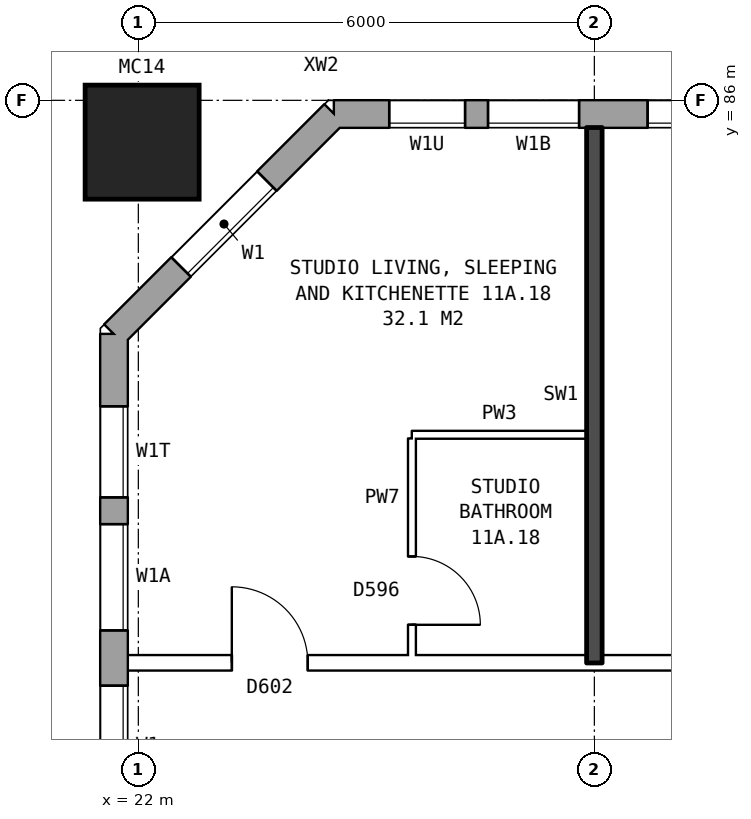
"""IFC4 building model, lengths in metres.
Left out: names, types, materials, properties, quantities, classifications, styles, units other than length and angle.
Written with IfcOpenShell. Run it as: python <this file> out.ifc"""

import sys

from ifc_helpers import new_model, si_unit, direction, frame, frame_2d, origin, origin_2d, place, context, subcontext, project, spatial, rectangle, hollow_rectangle, extrude, element, fill, save


model = new_model("IFC4")
c1 = context("Model", 3, precision=1e-05, world=origin(), true_north=direction((0.0, 1.0)))
c2 = subcontext(c1, "Body", "Model", "MODEL_VIEW")
j1 = project(units=[si_unit("LENGTHUNIT", "METRE"), si_unit("PLANEANGLEUNIT", "RADIAN")], contexts=[c1])
p1 = place(None, origin())
s1 = spatial("IfcSite", under=j1, at=p1, CompositionType="ELEMENT")
p2 = place(p1, origin())
s2 = spatial("IfcBuilding", under=s1, at=p2, CompositionType="ELEMENT")
p3 = place(p2, frame((0.0, 0.0, 44.3)))
s3 = spatial("IfcBuildingStorey", under=s2, at=p3, CompositionType="ELEMENT", Elevation=44.3)
p4 = place(p3, frame((22.05, 85.45, 0.0), z_axis=(0.0, 0.0, 1.0), x_axis=(1.0, 0.0, 0.0)))
e1 = element("IfcColumn", 1, at=p4, inside=s3, PredefinedType="COLUMN", context=c2, shape_type="SweptSolid", body=[
    extrude(hollow_rectangle(XDim=1.5, YDim=1.5, WallThickness=0.08, at=origin_2d()), origin(), (0.0, 0.0, 1.0), 3.1),
])
p5 = place(p3, frame((72.925, 85.82, 0.0), z_axis=(0.0, 0.0, 1.0), x_axis=(-1.0, 0.0, 0.0)))
e2 = element("IfcWall", 2, at=p5, inside=s3, PredefinedType="STANDARD", context=c2, shape_type="SweptSolid", body=[
    extrude(rectangle(XDim=48.351, YDim=0.36, at=frame_2d((24.175, 0.0))), origin(), (0.0, 0.0, 1.0), 2.85),
])
p6 = place(p5, frame((0.65, 0.0, 0.8)))
e3 = element("IfcOpeningElement", 3, at=p6, cuts=e2, PredefinedType="OPENING", context=c2, shape_type="SweptSolid", body=[
    extrude(rectangle(XDim=0.6, YDim=0.9, at=frame_2d((0.3, 0.45))), frame((0.0, 0.19, 0.0), z_axis=(0.0, -1.0, 0.0), x_axis=(1.0, 0.0, 0.0)), (0.0, 0.0, 1.0), 0.38),
])
p7 = place(p5, frame((3.625, 0.0, 0.8)))
e4 = element("IfcOpeningElement", 4, at=p7, cuts=e2, PredefinedType="OPENING", context=c2, shape_type="SweptSolid", body=[
    extrude(rectangle(XDim=1.6, YDim=1.8, at=frame_2d((0.8, 0.9))), frame((0.0, 0.19, 0.0), z_axis=(0.0, -1.0, 0.0), x_axis=(1.0, 0.0, 0.0)), (0.0, 0.0, 1.0), 0.38),
])
p8 = place(p5, frame((6.625, 0.0, 0.8)))
e5 = element("IfcOpeningElement", 5, at=p8, cuts=e2, PredefinedType="OPENING", context=c2, shape_type="SweptSolid", body=[
    extrude(rectangle(XDim=1.6, YDim=1.8, at=frame_2d((0.8, 0.9))), frame((0.0, 0.19, 0.0), z_axis=(0.0, -1.0, 0.0), x_axis=(1.0, 0.0, 0.0)), (0.0, 0.0, 1.0), 0.38),
])
p9 = place(p5, frame((9.625, 0.0, 0.8)))
e6 = element("IfcOpeningElement", 6, at=p9, cuts=e2, PredefinedType="OPENING", context=c2, shape_type="SweptSolid", body=[
    extrude(rectangle(XDim=1.6, YDim=1.8, at=frame_2d((0.8, 0.9))), frame((0.0, 0.19, 0.0), z_axis=(0.0, -1.0, 0.0), x_axis=(1.0, 0.0, 0.0)), (0.0, 0.0, 1.0), 0.38),
])
p10 = place(p5, frame((12.625, 0.0, 0.8)))
e7 = element("IfcOpeningElement", 7, at=p10, cuts=e2, PredefinedType="OPENING", context=c2, shape_type="SweptSolid", body=[
    extrude(rectangle(XDim=1.6, YDim=1.8, at=frame_2d((0.8, 0.9))), frame((0.0, 0.19, 0.0), z_axis=(0.0, -1.0, 0.0), x_axis=(1.0, 0.0, 0.0)), (0.0, 0.0, 1.0), 0.38),
])
p11 = place(p5, frame((15.625, 0.0, 0.8)))
e8 = element("IfcOpeningElement", 8, at=p11, cuts=e2, PredefinedType="OPENING", context=c2, shape_type="SweptSolid", body=[
    extrude(rectangle(XDim=1.6, YDim=1.8, at=frame_2d((0.8, 0.9))), frame((0.0, 0.19, 0.0), z_axis=(0.0, -1.0, 0.0), x_axis=(1.0, 0.0, 0.0)), (0.0, 0.0, 1.0), 0.38),
])
p12 = place(p5, frame((18.625, 0.0, 0.8)))
e9 = element("IfcOpeningElement", 9, at=p12, cuts=e2, PredefinedType="OPENING", context=c2, shape_type="SweptSolid", body=[
    extrude(rectangle(XDim=1.6, YDim=1.8, at=frame_2d((0.8, 0.9))), frame((0.0, 0.19, 0.0), z_axis=(0.0, -1.0, 0.0), x_axis=(1.0, 0.0, 0.0)), (0.0, 0.0, 1.0), 0.38),
])
p13 = place(p5, frame((21.625, 0.0, 0.8)))
e10 = element("IfcOpeningElement", 10, at=p13, cuts=e2, PredefinedType="OPENING", context=c2, shape_type="SweptSolid", body=[
    extrude(rectangle(XDim=1.6, YDim=1.8, at=frame_2d((0.8, 0.9))), frame((0.0, 0.19, 0.0), z_axis=(0.0, -1.0, 0.0), x_axis=(1.0, 0.0, 0.0)), (0.0, 0.0, 1.0), 0.38),
])
p14 = place(p5, frame((24.625, 0.0, 0.8)))
e11 = element("IfcOpeningElement", 11, at=p14, cuts=e2, PredefinedType="OPENING", context=c2, shape_type="SweptSolid", body=[
    extrude(rectangle(XDim=1.6, YDim=1.8, at=frame_2d((0.8, 0.9))), frame((0.0, 0.19, 0.0), z_axis=(0.0, -1.0, 0.0), x_axis=(1.0, 0.0, 0.0)), (0.0, 0.0, 1.0), 0.38),
])
p15 = place(p5, frame((27.625, 0.0, 0.8)))
e12 = element("IfcOpeningElement", 12, at=p15, cuts=e2, PredefinedType="OPENING", context=c2, shape_type="SweptSolid", body=[
    extrude(rectangle(XDim=1.6, YDim=1.8, at=frame_2d((0.8, 0.9))), frame((0.0, 0.19, 0.0), z_axis=(0.0, -1.0, 0.0), x_axis=(1.0, 0.0, 0.0)), (0.0, 0.0, 1.0), 0.38),
])
p16 = place(p5, frame((30.625, 0.0, 0.8)))
e13 = element("IfcOpeningElement", 13, at=p16, cuts=e2, PredefinedType="OPENING", context=c2, shape_type="SweptSolid", body=[
    extrude(rectangle(XDim=1.6, YDim=1.8, at=frame_2d((0.8, 0.9))), frame((0.0, 0.19, 0.0), z_axis=(0.0, -1.0, 0.0), x_axis=(1.0, 0.0, 0.0)), (0.0, 0.0, 1.0), 0.38),
])
p17 = place(p5, frame((33.625, 0.0, 0.8)))
e14 = element("IfcOpeningElement", 14, at=p17, cuts=e2, PredefinedType="OPENING", context=c2, shape_type="SweptSolid", body=[
    extrude(rectangle(XDim=1.6, YDim=1.8, at=frame_2d((0.8, 0.9))), frame((0.0, 0.19, 0.0), z_axis=(0.0, -1.0, 0.0), x_axis=(1.0, 0.0, 0.0)), (0.0, 0.0, 1.0), 0.38),
])
p18 = place(p5, frame((36.625, 0.0, 0.8)))
e15 = element("IfcOpeningElement", 15, at=p18, cuts=e2, PredefinedType="OPENING", context=c2, shape_type="SweptSolid", body=[
    extrude(rectangle(XDim=1.6, YDim=1.8, at=frame_2d((0.8, 0.9))), frame((0.0, 0.19, 0.0), z_axis=(0.0, -1.0, 0.0), x_axis=(1.0, 0.0, 0.0)), (0.0, 0.0, 1.0), 0.38),
])
p19 = place(p5, frame((39.625, 0.0, 0.8)))
e16 = element("IfcOpeningElement", 16, at=p19, cuts=e2, PredefinedType="OPENING", context=c2, shape_type="SweptSolid", body=[
    extrude(rectangle(XDim=1.6, YDim=1.8, at=frame_2d((0.8, 0.9))), frame((0.0, 0.19, 0.0), z_axis=(0.0, -1.0, 0.0), x_axis=(1.0, 0.0, 0.0)), (0.0, 0.0, 1.0), 0.38),
])
p20 = place(p5, frame((42.625, 0.0, 0.8)))
e17 = element("IfcOpeningElement", 17, at=p20, cuts=e2, PredefinedType="OPENING", context=c2, shape_type="SweptSolid", body=[
    extrude(rectangle(XDim=1.6, YDim=1.8, at=frame_2d((0.8, 0.9))), frame((0.0, 0.19, 0.0), z_axis=(0.0, -1.0, 0.0), x_axis=(1.0, 0.0, 0.0)), (0.0, 0.0, 1.0), 0.38),
])
p21 = place(p5, frame((45.125, 0.0, 0.8)))
e18 = element("IfcOpeningElement", 18, at=p21, cuts=e2, PredefinedType="OPENING", context=c2, shape_type="SweptSolid", body=[
    extrude(rectangle(XDim=1.2, YDim=1.8, at=frame_2d((0.6, 0.9))), frame((0.0, 0.19, 0.0), z_axis=(0.0, -1.0, 0.0), x_axis=(1.0, 0.0, 0.0)), (0.0, 0.0, 1.0), 0.38),
])
p22 = place(p5, frame((1.55, 0.0, 0.8)))
e19 = element("IfcOpeningElement", 19, at=p22, cuts=e2, PredefinedType="OPENING", context=c2, shape_type="SweptSolid", body=[
    extrude(rectangle(XDim=1.0, YDim=1.5, at=frame_2d((0.5, 0.75))), frame((0.0, 0.19, 0.0), z_axis=(0.0, -1.0, 0.0), x_axis=(1.0, 0.0, 0.0)), (0.0, 0.0, 1.0), 0.38),
])
p23 = place(p5, frame((46.625, 0.0, 0.8)))
e20 = element("IfcOpeningElement", 20, at=p23, cuts=e2, PredefinedType="OPENING", context=c2, shape_type="SweptSolid", body=[
    extrude(rectangle(XDim=1.0, YDim=0.9, at=frame_2d((0.5, 0.45))), frame((0.0, 0.19, 0.0), z_axis=(0.0, -1.0, 0.0), x_axis=(1.0, 0.0, 0.0)), (0.0, 0.0, 1.0), 0.38),
])
p24 = place(p3, frame((24.575, 85.82, 0.0), z_axis=(0.0, 0.0, 1.0), x_axis=(-0.707106781187, -0.707106781187, 0.0)))
e21 = element("IfcWall", 21, at=p24, inside=s3, PredefinedType="STANDARD", context=c2, shape_type="SweptSolid", body=[
    extrude(rectangle(XDim=4.094, YDim=0.36, at=frame_2d((2.047, 0.0))), origin(), (0.0, 0.0, 1.0), 2.85),
])
p25 = place(p24, frame((1.247, 0.0, 0.8)))
e22 = element("IfcOpeningElement", 22, at=p25, cuts=e21, PredefinedType="OPENING", context=c2, shape_type="SweptSolid", body=[
    extrude(rectangle(XDim=1.6, YDim=1.8, at=frame_2d((0.8, 0.9))), frame((0.0, 0.19, 0.0), z_axis=(0.0, -1.0, 0.0), x_axis=(1.0, 0.0, 0.0)), (0.0, 0.0, 1.0), 0.38),
])
p26 = place(p3, frame((21.68, 82.925, 0.0), z_axis=(0.0, 0.0, 1.0), x_axis=(0.0, -1.0, 0.0)))
e23 = element("IfcWall", 23, at=p26, inside=s3, PredefinedType="STANDARD", context=c2, shape_type="SweptSolid", body=[
    extrude(rectangle(XDim=25.851, YDim=0.36, at=frame_2d((12.925, 0.0))), origin(), (0.0, 0.0, 1.0), 2.85),
])
p27 = place(p26, frame((0.95, 0.0, 0.8)))
e24 = element("IfcOpeningElement", 24, at=p27, cuts=e23, PredefinedType="OPENING", context=c2, shape_type="SweptSolid", body=[
    extrude(rectangle(XDim=1.2, YDim=0.9, at=frame_2d((0.6, 0.45))), frame((0.0, 0.19, 0.0), z_axis=(0.0, -1.0, 0.0), x_axis=(1.0, 0.0, 0.0)), (0.0, 0.0, 1.0), 0.38),
])
p28 = place(p26, frame((4.625, 0.0, 0.8)))
e25 = element("IfcOpeningElement", 25, at=p28, cuts=e23, PredefinedType="OPENING", context=c2, shape_type="SweptSolid", body=[
    extrude(rectangle(XDim=1.6, YDim=1.8, at=frame_2d((0.8, 0.9))), frame((0.0, 0.19, 0.0), z_axis=(0.0, -1.0, 0.0), x_axis=(1.0, 0.0, 0.0)), (0.0, 0.0, 1.0), 0.38),
])
p29 = place(p26, frame((7.625, 0.0, 0.8)))
e26 = element("IfcOpeningElement", 26, at=p29, cuts=e23, PredefinedType="OPENING", context=c2, shape_type="SweptSolid", body=[
    extrude(rectangle(XDim=1.6, YDim=1.8, at=frame_2d((0.8, 0.9))), frame((0.0, 0.19, 0.0), z_axis=(0.0, -1.0, 0.0), x_axis=(1.0, 0.0, 0.0)), (0.0, 0.0, 1.0), 0.38),
])
p30 = place(p26, frame((10.625, 0.0, 0.8)))
e27 = element("IfcOpeningElement", 27, at=p30, cuts=e23, PredefinedType="OPENING", context=c2, shape_type="SweptSolid", body=[
    extrude(rectangle(XDim=1.6, YDim=1.8, at=frame_2d((0.8, 0.9))), frame((0.0, 0.19, 0.0), z_axis=(0.0, -1.0, 0.0), x_axis=(1.0, 0.0, 0.0)), (0.0, 0.0, 1.0), 0.38),
])
p31 = place(p26, frame((13.625, 0.0, 0.8)))
e28 = element("IfcOpeningElement", 28, at=p31, cuts=e23, PredefinedType="OPENING", context=c2, shape_type="SweptSolid", body=[
    extrude(rectangle(XDim=1.6, YDim=1.8, at=frame_2d((0.8, 0.9))), frame((0.0, 0.19, 0.0), z_axis=(0.0, -1.0, 0.0), x_axis=(1.0, 0.0, 0.0)), (0.0, 0.0, 1.0), 0.38),
])
p32 = place(p26, frame((16.625, 0.0, 0.8)))
e29 = element("IfcOpeningElement", 29, at=p32, cuts=e23, PredefinedType="OPENING", context=c2, shape_type="SweptSolid", body=[
    extrude(rectangle(XDim=1.6, YDim=1.8, at=frame_2d((0.8, 0.9))), frame((0.0, 0.19, 0.0), z_axis=(0.0, -1.0, 0.0), x_axis=(1.0, 0.0, 0.0)), (0.0, 0.0, 1.0), 0.38),
])
p33 = place(p26, frame((19.625, 0.0, 0.8)))
e30 = element("IfcOpeningElement", 30, at=p33, cuts=e23, PredefinedType="OPENING", context=c2, shape_type="SweptSolid", body=[
    extrude(rectangle(XDim=1.6, YDim=1.8, at=frame_2d((0.8, 0.9))), frame((0.0, 0.19, 0.0), z_axis=(0.0, -1.0, 0.0), x_axis=(1.0, 0.0, 0.0)), (0.0, 0.0, 1.0), 0.38),
])
p34 = place(p26, frame((21.725, 0.0, 0.8)))
e31 = element("IfcOpeningElement", 31, at=p34, cuts=e23, PredefinedType="OPENING", context=c2, shape_type="SweptSolid", body=[
    extrude(rectangle(XDim=1.6, YDim=1.8, at=frame_2d((0.8, 0.9))), frame((0.0, 0.19, 0.0), z_axis=(0.0, -1.0, 0.0), x_axis=(1.0, 0.0, 0.0)), (0.0, 0.0, 1.0), 0.38),
])
p35 = place(p26, frame((2.5, 0.0, 0.8)))
e32 = element("IfcOpeningElement", 32, at=p35, cuts=e23, PredefinedType="OPENING", context=c2, shape_type="SweptSolid", body=[
    extrude(rectangle(XDim=1.4, YDim=1.8, at=frame_2d((0.7, 0.9))), frame((0.0, 0.19, 0.0), z_axis=(0.0, -1.0, 0.0), x_axis=(1.0, 0.0, 0.0)), (0.0, 0.0, 1.0), 0.38),
])
p36 = place(p26, frame((23.625, 0.0, 0.8)))
e33 = element("IfcOpeningElement", 33, at=p36, cuts=e23, PredefinedType="OPENING", context=c2, shape_type="SweptSolid", body=[
    extrude(rectangle(XDim=0.6, YDim=1.2, at=frame_2d((0.3, 0.6))), frame((0.0, 0.19, 0.0), z_axis=(0.0, -1.0, 0.0), x_axis=(1.0, 0.0, 0.0)), (0.0, 0.0, 1.0), 0.38),
])
p37 = place(p3, frame((21.86, 78.6, 0.0), z_axis=(0.0, 0.0, 1.0), x_axis=(1.0, 0.0, 0.0)))
e34 = element("IfcWall", 34, at=p37, inside=s3, PredefinedType="PARTITIONING", context=c2, shape_type="SweptSolid", body=[
    extrude(rectangle(XDim=24.04, YDim=0.2, at=frame_2d((12.02, 0.0))), origin(), (0.0, 0.0, 1.0), 2.85),
])
p38 = place(p37, frame((20.59, 0.0, 0.0)))
e35 = element("IfcOpeningElement", 35, at=p38, cuts=e34, PredefinedType="OPENING", context=c2, shape_type="SweptSolid", body=[
    extrude(rectangle(XDim=1.0, YDim=2.1, at=frame_2d((0.5, 1.05))), frame((0.0, 0.11, 0.0), z_axis=(0.0, -1.0, 0.0), x_axis=(1.0, 0.0, 0.0)), (0.0, 0.0, 1.0), 0.22),
])
p39 = place(p37, frame((8.64, 0.0, 0.0)))
e36 = element("IfcOpeningElement", 36, at=p39, cuts=e34, PredefinedType="OPENING", context=c2, shape_type="SweptSolid", body=[
    extrude(rectangle(XDim=1.0, YDim=2.1, at=frame_2d((0.5, 1.05))), frame((0.0, 0.11, 0.0), z_axis=(0.0, -1.0, 0.0), x_axis=(1.0, 0.0, 0.0)), (0.0, 0.0, 1.0), 0.22),
])
p40 = place(p37, frame((1.37, 0.0, 0.0)))
e37 = element("IfcOpeningElement", 37, at=p40, cuts=e34, PredefinedType="OPENING", context=c2, shape_type="SweptSolid", body=[
    extrude(rectangle(XDim=1.0, YDim=2.1, at=frame_2d((0.5, 1.05))), frame((0.0, 0.11, 0.0), z_axis=(0.0, -1.0, 0.0), x_axis=(1.0, 0.0, 0.0)), (0.0, 0.0, 1.0), 0.22),
])
p41 = place(p3, frame((25.6, 81.6, 0.0), z_axis=(0.0, 0.0, 1.0), x_axis=(1.0, 0.0, 0.0)))
e38 = element("IfcWall", 38, at=p41, inside=s3, PredefinedType="PARTITIONING", context=c2, shape_type="SweptSolid", body=[
    extrude(rectangle(XDim=2.3, YDim=0.1, at=frame_2d((1.15, 0.0))), origin(), (0.0, 0.0, 1.0), 2.85),
])
p42 = place(p3, frame((25.6, 78.7, 0.0), z_axis=(0.0, 0.0, 1.0), x_axis=(0.0, 1.0, 0.0)))
e39 = element("IfcWall", 39, at=p42, inside=s3, PredefinedType="PARTITIONING", context=c2, shape_type="SweptSolid", body=[
    extrude(rectangle(XDim=2.85, YDim=0.1, at=frame_2d((1.425, 0.0))), origin(), (0.0, 0.0, 1.0), 2.85),
])
p43 = place(p42, frame((0.4, 0.0, 0.0)))
e40 = element("IfcOpeningElement", 40, at=p43, cuts=e39, PredefinedType="OPENING", context=c2, shape_type="SweptSolid", body=[
    extrude(rectangle(XDim=0.9, YDim=2.1, at=frame_2d((0.45, 1.05))), frame((0.0, 0.06, 0.0), z_axis=(0.0, -1.0, 0.0), x_axis=(1.0, 0.0, 0.0)), (0.0, 0.0, 1.0), 0.12),
])
p44 = place(p3, frame((28.0, 78.6, 0.0), z_axis=(0.0, 0.0, 1.0), x_axis=(0.0, 1.0, 0.0)))
e41 = element("IfcWall", 41, at=p44, inside=s3, PredefinedType="SOLIDWALL", context=c2, shape_type="SweptSolid", body=[
    extrude(rectangle(XDim=7.04, YDim=0.2, at=frame_2d((3.52, 0.0))), origin(), (0.0, 0.0, 1.0), 2.85),
])
p45 = place(p20, origin())
e42 = element("IfcWindow", 42, at=p45, inside=s3, PartitioningType="SINGLE_PANEL", PredefinedType="WINDOW", context=c2, shape_type="SweptSolid", body=[
    extrude(rectangle(XDim=1.6, YDim=1.8, at=frame_2d((0.8, 0.9))), frame((0.0, 0.15, 0.0), z_axis=(0.0, -1.0, 0.0), x_axis=(1.0, 0.0, 0.0)), (0.0, 0.0, 1.0), 0.06),
])
fill(e17, e42)
p46 = place(p21, origin())
e43 = element("IfcWindow", 43, at=p46, inside=s3, PartitioningType="SINGLE_PANEL", PredefinedType="WINDOW", context=c2, shape_type="SweptSolid", body=[
    extrude(rectangle(XDim=1.2, YDim=1.8, at=frame_2d((0.6, 0.9))), frame((0.0, 0.15, 0.0), z_axis=(0.0, -1.0, 0.0), x_axis=(1.0, 0.0, 0.0)), (0.0, 0.0, 1.0), 0.06),
])
fill(e18, e43)
p47 = place(p25, origin())
e44 = element("IfcWindow", 44, at=p47, inside=s3, PartitioningType="SINGLE_PANEL", PredefinedType="WINDOW", context=c2, shape_type="SweptSolid", body=[
    extrude(rectangle(XDim=1.6, YDim=1.8, at=frame_2d((0.8, 0.9))), frame((0.0, 0.15, 0.0), z_axis=(0.0, -1.0, 0.0), x_axis=(1.0, 0.0, 0.0)), (0.0, 0.0, 1.0), 0.06),
])
fill(e22, e44)
p48 = place(p27, origin())
e45 = element("IfcWindow", 45, at=p48, inside=s3, PartitioningType="SINGLE_PANEL", PredefinedType="WINDOW", context=c2, shape_type="SweptSolid", body=[
    extrude(rectangle(XDim=1.2, YDim=0.9, at=frame_2d((0.6, 0.45))), frame((0.0, 0.15, 0.0), z_axis=(0.0, -1.0, 0.0), x_axis=(1.0, 0.0, 0.0)), (0.0, 0.0, 1.0), 0.06),
])
fill(e24, e45)
p49 = place(p28, origin())
e46 = element("IfcWindow", 46, at=p49, inside=s3, PartitioningType="SINGLE_PANEL", PredefinedType="WINDOW", context=c2, shape_type="SweptSolid", body=[
    extrude(rectangle(XDim=1.6, YDim=1.8, at=frame_2d((0.8, 0.9))), frame((0.0, 0.15, 0.0), z_axis=(0.0, -1.0, 0.0), x_axis=(1.0, 0.0, 0.0)), (0.0, 0.0, 1.0), 0.06),
])
fill(e25, e46)
p50 = place(p40, origin())
e47 = element("IfcDoor", 47, at=p50, inside=s3, OperationType="SINGLE_SWING_LEFT", PredefinedType="DOOR", context=c2, shape_type="SweptSolid", body=[
    extrude(rectangle(XDim=1.0, YDim=2.1, at=frame_2d((0.5, 1.05))), frame((0.0, 0.025, 0.0), z_axis=(0.0, -1.0, 0.0), x_axis=(1.0, 0.0, 0.0)), (0.0, 0.0, 1.0), 0.05),
])
fill(e37, e47)
p51 = place(p43, frame((0.9, 0.0, 0.0), z_axis=(0.0, 0.0, 1.0), x_axis=(-1.0, 0.0, 0.0)))
e48 = element("IfcDoor", 48, at=p51, inside=s3, OperationType="SINGLE_SWING_RIGHT", PredefinedType="DOOR", context=c2, shape_type="SweptSolid", body=[
    extrude(rectangle(XDim=0.9, YDim=2.1, at=frame_2d((0.45, 1.05))), frame((0.0, 0.025, 0.0), z_axis=(0.0, -1.0, 0.0), x_axis=(1.0, 0.0, 0.0)), (0.0, 0.0, 1.0), 0.05),
])
fill(e40, e48)
p52 = place(p23, origin())
e49 = element("IfcWindow", 49, at=p52, inside=s3, PartitioningType="SINGLE_PANEL", PredefinedType="WINDOW", context=c2, shape_type="SweptSolid", body=[
    extrude(rectangle(XDim=1.0, YDim=0.9, at=frame_2d((0.5, 0.45))), frame((0.0, 0.15, 0.0), z_axis=(0.0, -1.0, 0.0), x_axis=(1.0, 0.0, 0.0)), (0.0, 0.0, 1.0), 0.06),
])
fill(e20, e49)
p53 = place(p35, origin())
e50 = element("IfcWindow", 50, at=p53, inside=s3, PartitioningType="SINGLE_PANEL", PredefinedType="WINDOW", context=c2, shape_type="SweptSolid", body=[
    extrude(rectangle(XDim=1.4, YDim=1.8, at=frame_2d((0.7, 0.9))), frame((0.0, 0.15, 0.0), z_axis=(0.0, -1.0, 0.0), x_axis=(1.0, 0.0, 0.0)), (0.0, 0.0, 1.0), 0.06),
])
fill(e32, e50)
save(model, sys.argv[1])
